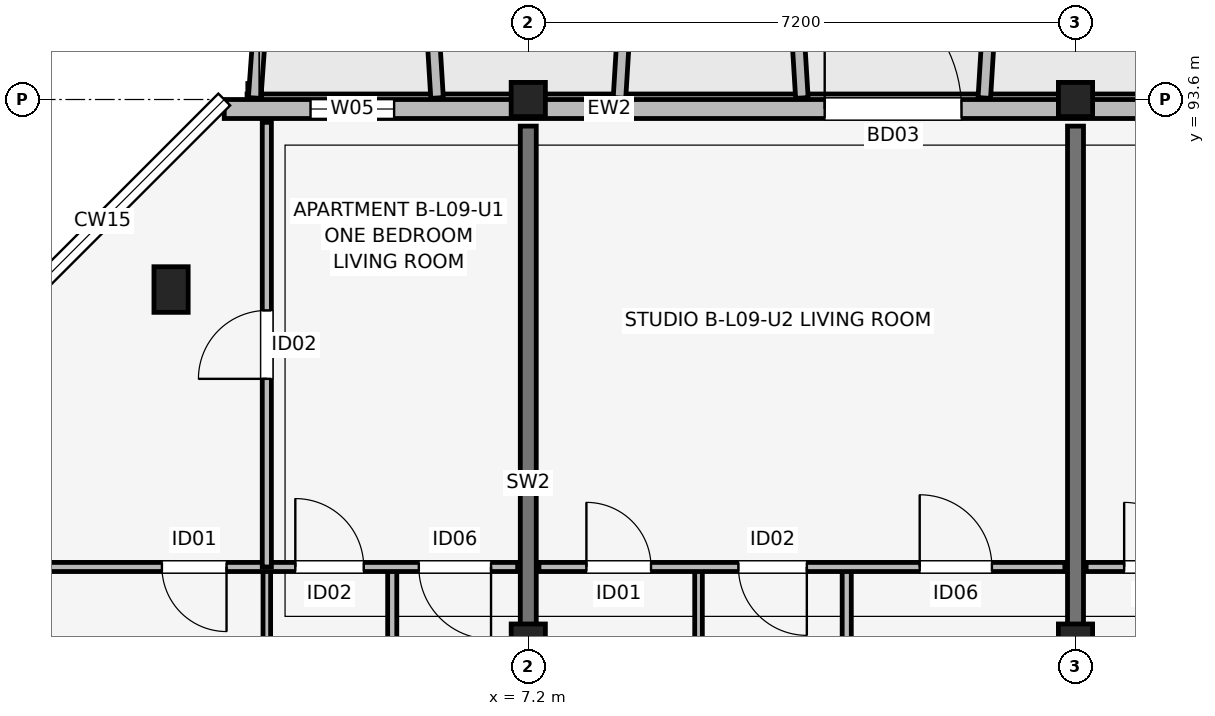
"""IFC4 building model, lengths in metres.
Left out: names, types, materials, properties, quantities, classifications, styles, units other than length and angle.
Written with IfcOpenShell. Run it as: python <this file> out.ifc"""

import sys

from ifc_helpers import new_model, si_unit, direction, frame, frame_2d, origin, origin_2d, place, context, subcontext, project, spatial, rectangle, extrude, element, fill, save


model = new_model("IFC4")
c1 = context("Model", 3, precision=1e-05, world=origin(), true_north=direction((0.0, 1.0)))
c2 = subcontext(c1, "Body", "Model", "MODEL_VIEW")
j1 = project(units=[si_unit("LENGTHUNIT", "METRE"), si_unit("PLANEANGLEUNIT", "RADIAN")], contexts=[c1])
p1 = place(None, origin())
s1 = spatial("IfcSite", under=j1, at=p1, CompositionType="ELEMENT")
p2 = place(p1, origin())
s2 = spatial("IfcBuilding", under=s1, at=p2, CompositionType="ELEMENT")
p3 = place(p2, frame((0.0, 0.0, 30.75)))
s3 = spatial("IfcBuildingStorey", under=s2, at=p3, CompositionType="ELEMENT", Elevation=30.75)
for number, where, z_axis, x_axis in (
    (1, (2.5, 91.1, 0.0), (0.0, 0.0, 1.0), (1.0, 0.0, 0.0)),
    (2, (7.2, 86.4, 0.0), (0.0, 0.0, 1.0), (1.0, 0.0, 0.0)),
):
    element("IfcColumn", number, at=place(p3, frame(where, z_axis=z_axis, x_axis=x_axis)), inside=s3, PredefinedType="COLUMN", context=c2, shape_type="SweptSolid", body=[
        extrude(rectangle(XDim=0.45, YDim=0.6, at=origin_2d()), origin(), (0.0, 0.0, 1.0), 3.15),
    ])
p4 = place(p3, frame((7.2, 93.6, 0.0), z_axis=(0.0, 0.0, 1.0), x_axis=(1.0, 0.0, 0.0)))
e3 = element("IfcColumn", 3, at=p4, inside=s3, PredefinedType="COLUMN", context=c2, shape_type="SweptSolid", body=[
    extrude(rectangle(XDim=0.45, YDim=0.45, at=origin_2d()), origin(), (0.0, 0.0, 1.0), 3.15),
])
p5 = place(p3, frame((14.4, 86.4, 0.0), z_axis=(0.0, 0.0, 1.0), x_axis=(1.0, 0.0, 0.0)))
e4 = element("IfcColumn", 4, at=p5, inside=s3, PredefinedType="COLUMN", context=c2, shape_type="SweptSolid", body=[
    extrude(rectangle(XDim=0.45, YDim=0.6, at=origin_2d()), origin(), (0.0, 0.0, 1.0), 3.15),
])
p6 = place(p3, frame((14.4, 93.6, 0.0), z_axis=(0.0, 0.0, 1.0), x_axis=(1.0, 0.0, 0.0)))
e5 = element("IfcColumn", 5, at=p6, inside=s3, PredefinedType="COLUMN", context=c2, shape_type="SweptSolid", body=[
    extrude(rectangle(XDim=0.45, YDim=0.45, at=origin_2d()), origin(), (0.0, 0.0, 1.0), 3.15),
])
for number, where, z_axis, x_axis in (
    (6, (7.2, 83.85, 0.0), (0.0, 0.0, 1.0), (0.0, 1.0, 0.0)),
    (7, (14.4, 83.85, 0.0), (0.0, 0.0, 1.0), (0.0, 1.0, 0.0)),
):
    element("IfcWall", number, at=place(p3, frame(where, z_axis=z_axis, x_axis=x_axis)), inside=s3, PredefinedType="SHEAR", context=c2, shape_type="SweptSolid", body=[
        extrude(rectangle(XDim=9.4, YDim=0.21, at=frame_2d((4.7, 0.0))), origin(), (0.0, 0.0, 1.0), 3.15),
    ])
p7 = place(p3, frame((32.8, 93.475, 0.0), z_axis=(0.0, 0.0, 1.0), x_axis=(-1.0, 0.0, 0.0)))
e8 = element("IfcWall", 8, at=p7, inside=s3, PredefinedType="SOLIDWALL", context=c2, shape_type="SweptSolid", body=[
    extrude(rectangle(XDim=29.6, YDim=0.25, at=frame_2d((14.8, 0.0))), origin(), (0.0, 0.0, 1.0), 2.45),
])
p8 = place(p7, frame((21.7, 0.0, 0.0), z_axis=(0.0, 0.0, 1.0), x_axis=(-1.0, 0.0, 0.0)))
e9 = element("IfcOpeningElement", 9, at=p8, cuts=e8, PredefinedType="OPENING", context=c2, shape_type="SweptSolid", body=[
    extrude(rectangle(XDim=1.8, YDim=2.15, at=frame_2d((0.9, 1.075))), frame((0.0, 0.135, 0.0), z_axis=(0.0, -1.0, 0.0), x_axis=(1.0, 0.0, 0.0)), (0.0, 0.0, 1.0), 0.27),
])
p9 = place(p7, frame((7.225, 0.0, 0.0), z_axis=(0.0, 0.0, 1.0), x_axis=(-1.0, 0.0, 0.0)))
e10 = element("IfcOpeningElement", 10, at=p9, cuts=e8, PredefinedType="OPENING", context=c2, shape_type="SweptSolid", body=[
    extrude(rectangle(XDim=1.65, YDim=2.15, at=frame_2d((0.825, 1.075))), frame((0.0, 0.135, 0.0), z_axis=(0.0, -1.0, 0.0), x_axis=(1.0, 0.0, 0.0)), (0.0, 0.0, 1.0), 0.27),
])
p10 = place(p7, frame((27.365, 0.0, 0.75)))
e11 = element("IfcOpeningElement", 11, at=p10, cuts=e8, PredefinedType="OPENING", context=c2, shape_type="SweptSolid", body=[
    extrude(rectangle(XDim=1.1, YDim=1.5, at=frame_2d((0.55, 0.75))), frame((0.0, 0.135, 0.0), z_axis=(0.0, -1.0, 0.0), x_axis=(1.0, 0.0, 0.0)), (0.0, 0.0, 1.0), 0.27),
])
p11 = place(p7, frame((14.925, 0.0, 0.69)))
e12 = element("IfcOpeningElement", 12, at=p11, cuts=e8, PredefinedType="OPENING", context=c2, shape_type="SweptSolid", body=[
    extrude(rectangle(XDim=2.15, YDim=1.65, at=frame_2d((1.075, 0.825))), frame((0.0, 0.135, 0.0), z_axis=(0.0, -1.0, 0.0), x_axis=(1.0, 0.0, 0.0)), (0.0, 0.0, 1.0), 0.27),
])
p12 = place(p7, frame((10.167, 0.0, 0.75)))
e13 = element("IfcOpeningElement", 13, at=p12, cuts=e8, PredefinedType="OPENING", context=c2, shape_type="SweptSolid", body=[
    extrude(rectangle(XDim=0.6, YDim=1.25, at=frame_2d((0.3, 0.625))), frame((0.0, 0.135, 0.0), z_axis=(0.0, -1.0, 0.0), x_axis=(1.0, 0.0, 0.0)), (0.0, 0.0, 1.0), 0.27),
])
p13 = place(p7, frame((2.968, 0.0, 0.75)))
e14 = element("IfcOpeningElement", 14, at=p13, cuts=e8, PredefinedType="OPENING", context=c2, shape_type="SweptSolid", body=[
    extrude(rectangle(XDim=0.6, YDim=1.25, at=frame_2d((0.3, 0.625))), frame((0.0, 0.135, 0.0), z_axis=(0.0, -1.0, 0.0), x_axis=(1.0, 0.0, 0.0)), (0.0, 0.0, 1.0), 0.27),
])
p14 = place(p7, frame((0.9, 0.0, 0.75)))
e15 = element("IfcOpeningElement", 15, at=p14, cuts=e8, PredefinedType="OPENING", context=c2, shape_type="SweptSolid", body=[
    extrude(rectangle(XDim=0.6, YDim=1.25, at=frame_2d((0.3, 0.625))), frame((0.0, 0.135, 0.0), z_axis=(0.0, -1.0, 0.0), x_axis=(1.0, 0.0, 0.0)), (0.0, 0.0, 1.0), 0.27),
])
p15 = place(p3, frame((3.6, 93.62, 0.0), z_axis=(0.0, 0.0, 1.0), x_axis=(0.071194071069, 0.997462482625, 0.0)))
e16 = element("IfcWall", 16, at=p15, inside=s3, PredefinedType="ELEMENTEDWALL", context=c2, shape_type="SweptSolid", body=[
    extrude(rectangle(XDim=1.965, YDim=0.165, at=frame_2d((0.982, 0.0))), origin(), (0.0, 0.0, 1.0), 2.8),
])
p16 = place(p3, frame((6.0, 93.62, 0.0), z_axis=(0.0, 0.0, 1.0), x_axis=(-0.061170732449, 0.998127317276, 0.0)))
e17 = element("IfcWall", 17, at=p16, inside=s3, PredefinedType="ELEMENTEDWALL", context=c2, shape_type="SweptSolid", body=[
    extrude(rectangle(XDim=1.964, YDim=0.165, at=frame_2d((0.982, 0.0))), origin(), (0.0, 0.0, 1.0), 2.8),
])
for number, where, z_axis, x_axis in (
    (18, (8.4, 93.62, 0.0), (0.0, 0.0, 1.0), (0.061, 0.998, 0.0)),
    (19, (10.8, 93.62, 0.0), (0.0, 0.0, 1.0), (-0.061, 0.998, 0.0)),
    (20, (13.2, 93.62, 0.0), (0.0, 0.0, 1.0), (0.061, 0.998, 0.0)),
):
    element("IfcWall", number, at=place(p3, frame(where, z_axis=z_axis, x_axis=x_axis)), inside=s3, PredefinedType="ELEMENTEDWALL", context=c2, shape_type="SweptSolid", body=[
        extrude(rectangle(XDim=1.964, YDim=0.165, at=frame_2d((0.982, 0.0))), origin(), (0.0, 0.0, 1.0), 2.58),
    ])
p17 = place(p3, frame((3.76, 83.7, 0.0), z_axis=(0.0, 0.0, 1.0), x_axis=(0.0, 1.0, 0.0)))
e21 = element("IfcWall", 21, at=p17, inside=s3, PredefinedType="PARTITIONING", context=c2, shape_type="SweptSolid", body=[
    extrude(rectangle(XDim=3.75, YDim=0.1, at=frame_2d((1.875, 0.0))), origin(), (0.0, 0.0, 1.0), 2.38),
])
p18 = place(p3, frame((5.41, 83.7, 0.0), z_axis=(0.0, 0.0, 1.0), x_axis=(0.0, 1.0, 0.0)))
e22 = element("IfcWall", 22, at=p18, inside=s3, PredefinedType="PARTITIONING", context=c2, shape_type="SweptSolid", body=[
    extrude(rectangle(XDim=3.75, YDim=0.12, at=frame_2d((1.875, 0.0))), origin(), (0.0, 0.0, 1.0), 2.38),
])
p19 = place(p3, frame((0.14, 87.45, 0.0), z_axis=(0.0, 0.0, 1.0), x_axis=(1.0, 0.0, 0.0)))
e23 = element("IfcWall", 23, at=p19, inside=s3, PredefinedType="PARTITIONING", context=c2, shape_type="SweptSolid", body=[
    extrude(rectangle(XDim=6.92, YDim=0.12, at=frame_2d((3.46, 0.0))), origin(), (0.0, 0.0, 1.0), 2.38),
])
p20 = place(p19, frame((3.09, 0.0, 0.0), z_axis=(0.0, 0.0, 1.0), x_axis=(-1.0, 0.0, 0.0)))
e24 = element("IfcOpeningElement", 24, at=p20, cuts=e23, PredefinedType="OPENING", context=c2, shape_type="SweptSolid", body=[
    extrude(rectangle(XDim=0.85, YDim=2.08, at=frame_2d((0.425, 1.04))), frame((0.0, 0.07, 0.0), z_axis=(0.0, -1.0, 0.0), x_axis=(1.0, 0.0, 0.0)), (0.0, 0.0, 1.0), 0.14),
])
p21 = place(p19, frame((3.995, 0.0, 0.0)))
e25 = element("IfcOpeningElement", 25, at=p21, cuts=e23, PredefinedType="OPENING", context=c2, shape_type="SweptSolid", body=[
    extrude(rectangle(XDim=0.9, YDim=2.08, at=frame_2d((0.45, 1.04))), frame((0.0, 0.07, 0.0), z_axis=(0.0, -1.0, 0.0), x_axis=(1.0, 0.0, 0.0)), (0.0, 0.0, 1.0), 0.14),
])
p22 = place(p19, frame((6.57, 0.0, 0.0), z_axis=(0.0, 0.0, 1.0), x_axis=(-1.0, 0.0, 0.0)))
e26 = element("IfcOpeningElement", 26, at=p22, cuts=e23, PredefinedType="OPENING", context=c2, shape_type="SweptSolid", body=[
    extrude(rectangle(XDim=0.95, YDim=2.08, at=frame_2d((0.475, 1.04))), frame((0.0, 0.07, 0.0), z_axis=(0.0, -1.0, 0.0), x_axis=(1.0, 0.0, 0.0)), (0.0, 0.0, 1.0), 0.14),
])
p23 = place(p3, frame((3.76, 87.45, 0.0), z_axis=(0.0, 0.0, 1.0), x_axis=(0.0, 1.0, 0.0)))
e27 = element("IfcWall", 27, at=p23, inside=s3, PredefinedType="PARTITIONING", context=c2, shape_type="SweptSolid", body=[
    extrude(rectangle(XDim=5.85, YDim=0.12, at=frame_2d((2.925, 0.0))), origin(), (0.0, 0.0, 1.0), 2.38),
])
p24 = place(p23, frame((2.475, 0.0, 0.0)))
e28 = element("IfcOpeningElement", 28, at=p24, cuts=e27, PredefinedType="OPENING", context=c2, shape_type="SweptSolid", body=[
    extrude(rectangle(XDim=0.9, YDim=2.08, at=frame_2d((0.45, 1.04))), frame((0.0, 0.07, 0.0), z_axis=(0.0, -1.0, 0.0), x_axis=(1.0, 0.0, 0.0)), (0.0, 0.0, 1.0), 0.14),
])
p25 = place(p3, frame((9.44, 83.7, 0.0), z_axis=(0.0, 0.0, 1.0), x_axis=(0.0, 1.0, 0.0)))
e29 = element("IfcWall", 29, at=p25, inside=s3, PredefinedType="PARTITIONING", context=c2, shape_type="SweptSolid", body=[
    extrude(rectangle(XDim=3.75, YDim=0.1, at=frame_2d((1.875, 0.0))), origin(), (0.0, 0.0, 1.0), 2.38),
])
p26 = place(p3, frame((11.39, 83.7, 0.0), z_axis=(0.0, 0.0, 1.0), x_axis=(0.0, 1.0, 0.0)))
e30 = element("IfcWall", 30, at=p26, inside=s3, PredefinedType="PARTITIONING", context=c2, shape_type="SweptSolid", body=[
    extrude(rectangle(XDim=3.75, YDim=0.12, at=frame_2d((1.875, 0.0))), origin(), (0.0, 0.0, 1.0), 2.38),
])
p27 = place(p3, frame((7.34, 87.45, 0.0), z_axis=(0.0, 0.0, 1.0), x_axis=(1.0, 0.0, 0.0)))
e31 = element("IfcWall", 31, at=p27, inside=s3, PredefinedType="PARTITIONING", context=c2, shape_type="SweptSolid", body=[
    extrude(rectangle(XDim=6.92, YDim=0.12, at=frame_2d((3.46, 0.0))), origin(), (0.0, 0.0, 1.0), 2.38),
])
p28 = place(p27, frame((0.625, 0.0, 0.0)))
e32 = element("IfcOpeningElement", 32, at=p28, cuts=e31, PredefinedType="OPENING", context=c2, shape_type="SweptSolid", body=[
    extrude(rectangle(XDim=0.85, YDim=2.08, at=frame_2d((0.425, 1.04))), frame((0.0, 0.07, 0.0), z_axis=(0.0, -1.0, 0.0), x_axis=(1.0, 0.0, 0.0)), (0.0, 0.0, 1.0), 0.14),
])
p29 = place(p27, frame((3.525, 0.0, 0.0), z_axis=(0.0, 0.0, 1.0), x_axis=(-1.0, 0.0, 0.0)))
e33 = element("IfcOpeningElement", 33, at=p29, cuts=e31, PredefinedType="OPENING", context=c2, shape_type="SweptSolid", body=[
    extrude(rectangle(XDim=0.9, YDim=2.08, at=frame_2d((0.45, 1.04))), frame((0.0, 0.07, 0.0), z_axis=(0.0, -1.0, 0.0), x_axis=(1.0, 0.0, 0.0)), (0.0, 0.0, 1.0), 0.14),
])
p30 = place(p27, frame((5.01, 0.0, 0.0)))
e34 = element("IfcOpeningElement", 34, at=p30, cuts=e31, PredefinedType="OPENING", context=c2, shape_type="SweptSolid", body=[
    extrude(rectangle(XDim=0.95, YDim=2.08, at=frame_2d((0.475, 1.04))), frame((0.0, 0.07, 0.0), z_axis=(0.0, -1.0, 0.0), x_axis=(1.0, 0.0, 0.0)), (0.0, 0.0, 1.0), 0.14),
])
p31 = place(p3, frame((14.54, 87.45, 0.0), z_axis=(0.0, 0.0, 1.0), x_axis=(1.0, 0.0, 0.0)))
e35 = element("IfcWall", 35, at=p31, inside=s3, PredefinedType="PARTITIONING", context=c2, shape_type="SweptSolid", body=[
    extrude(rectangle(XDim=6.92, YDim=0.12, at=frame_2d((3.46, 0.0))), origin(), (0.0, 0.0, 1.0), 2.38),
])
p32 = place(p31, frame((0.5, 0.0, 0.0)))
e36 = element("IfcOpeningElement", 36, at=p32, cuts=e35, PredefinedType="OPENING", context=c2, shape_type="SweptSolid", body=[
    extrude(rectangle(XDim=0.85, YDim=2.08, at=frame_2d((0.425, 1.04))), frame((0.0, 0.07, 0.0), z_axis=(0.0, -1.0, 0.0), x_axis=(1.0, 0.0, 0.0)), (0.0, 0.0, 1.0), 0.14),
])
p33 = place(p31, frame((3.275, 0.0, 0.0), z_axis=(0.0, 0.0, 1.0), x_axis=(-1.0, 0.0, 0.0)))
e37 = element("IfcOpeningElement", 37, at=p33, cuts=e35, PredefinedType="OPENING", context=c2, shape_type="SweptSolid", body=[
    extrude(rectangle(XDim=0.9, YDim=2.08, at=frame_2d((0.45, 1.04))), frame((0.0, 0.07, 0.0), z_axis=(0.0, -1.0, 0.0), x_axis=(1.0, 0.0, 0.0)), (0.0, 0.0, 1.0), 0.14),
])
p34 = place(p31, frame((4.885, 0.0, 0.0)))
e38 = element("IfcOpeningElement", 38, at=p34, cuts=e35, PredefinedType="OPENING", context=c2, shape_type="SweptSolid", body=[
    extrude(rectangle(XDim=0.95, YDim=2.08, at=frame_2d((0.475, 1.04))), frame((0.0, 0.07, 0.0), z_axis=(0.0, -1.0, 0.0), x_axis=(1.0, 0.0, 0.0)), (0.0, 0.0, 1.0), 0.14),
])
p35 = place(p8, origin())
e39 = element("IfcDoor", 39, at=p35, inside=s3, OperationType="SINGLE_SWING_RIGHT", PredefinedType="DOOR", context=c2, shape_type="SweptSolid", body=[
    extrude(rectangle(XDim=1.8, YDim=2.15, at=frame_2d((0.9, 1.075))), frame((0.0, 0.025, 0.0), z_axis=(0.0, -1.0, 0.0), x_axis=(1.0, 0.0, 0.0)), (0.0, 0.0, 1.0), 0.05),
])
fill(e9, e39)
p36 = place(p10, origin())
e40 = element("IfcWindow", 40, at=p36, inside=s3, PartitioningType="SINGLE_PANEL", PredefinedType="WINDOW", context=c2, shape_type="SweptSolid", body=[
    extrude(rectangle(XDim=1.1, YDim=1.5, at=frame_2d((0.55, 0.75))), frame((0.0, 0.03, 0.0), z_axis=(0.0, -1.0, 0.0), x_axis=(1.0, 0.0, 0.0)), (0.0, 0.0, 1.0), 0.06),
])
fill(e11, e40)
p37 = place(p20, origin())
e41 = element("IfcDoor", 41, at=p37, inside=s3, OperationType="SINGLE_SWING_RIGHT", PredefinedType="DOOR", context=c2, shape_type="SweptSolid", body=[
    extrude(rectangle(XDim=0.85, YDim=2.08, at=frame_2d((0.425, 1.04))), frame((0.0, 0.025, 0.0), z_axis=(0.0, -1.0, 0.0), x_axis=(1.0, 0.0, 0.0)), (0.0, 0.0, 1.0), 0.05),
])
fill(e24, e41)
p38 = place(p21, origin())
e42 = element("IfcDoor", 42, at=p38, inside=s3, OperationType="SINGLE_SWING_LEFT", PredefinedType="DOOR", context=c2, shape_type="SweptSolid", body=[
    extrude(rectangle(XDim=0.9, YDim=2.08, at=frame_2d((0.45, 1.04))), frame((0.0, 0.025, 0.0), z_axis=(0.0, -1.0, 0.0), x_axis=(1.0, 0.0, 0.0)), (0.0, 0.0, 1.0), 0.05),
])
fill(e25, e42)
p39 = place(p22, origin())
e43 = element("IfcDoor", 43, at=p39, inside=s3, OperationType="SINGLE_SWING_RIGHT", PredefinedType="DOOR", context=c2, shape_type="SweptSolid", body=[
    extrude(rectangle(XDim=0.95, YDim=2.08, at=frame_2d((0.475, 1.04))), frame((0.0, 0.025, 0.0), z_axis=(0.0, -1.0, 0.0), x_axis=(1.0, 0.0, 0.0)), (0.0, 0.0, 1.0), 0.05),
])
fill(e26, e43)
p40 = place(p24, origin())
e44 = element("IfcDoor", 44, at=p40, inside=s3, OperationType="SINGLE_SWING_LEFT", PredefinedType="DOOR", context=c2, shape_type="SweptSolid", body=[
    extrude(rectangle(XDim=0.9, YDim=2.08, at=frame_2d((0.45, 1.04))), frame((0.0, 0.025, 0.0), z_axis=(0.0, -1.0, 0.0), x_axis=(1.0, 0.0, 0.0)), (0.0, 0.0, 1.0), 0.05),
])
fill(e28, e44)
p41 = place(p28, origin())
e45 = element("IfcDoor", 45, at=p41, inside=s3, OperationType="SINGLE_SWING_LEFT", PredefinedType="DOOR", context=c2, shape_type="SweptSolid", body=[
    extrude(rectangle(XDim=0.85, YDim=2.08, at=frame_2d((0.425, 1.04))), frame((0.0, 0.025, 0.0), z_axis=(0.0, -1.0, 0.0), x_axis=(1.0, 0.0, 0.0)), (0.0, 0.0, 1.0), 0.05),
])
fill(e32, e45)
p42 = place(p29, origin())
e46 = element("IfcDoor", 46, at=p42, inside=s3, OperationType="SINGLE_SWING_RIGHT", PredefinedType="DOOR", context=c2, shape_type="SweptSolid", body=[
    extrude(rectangle(XDim=0.9, YDim=2.08, at=frame_2d((0.45, 1.04))), frame((0.0, 0.025, 0.0), z_axis=(0.0, -1.0, 0.0), x_axis=(1.0, 0.0, 0.0)), (0.0, 0.0, 1.0), 0.05),
])
fill(e33, e46)
p43 = place(p30, origin())
e47 = element("IfcDoor", 47, at=p43, inside=s3, OperationType="SINGLE_SWING_LEFT", PredefinedType="DOOR", context=c2, shape_type="SweptSolid", body=[
    extrude(rectangle(XDim=0.95, YDim=2.08, at=frame_2d((0.475, 1.04))), frame((0.0, 0.025, 0.0), z_axis=(0.0, -1.0, 0.0), x_axis=(1.0, 0.0, 0.0)), (0.0, 0.0, 1.0), 0.05),
])
fill(e34, e47)
p44 = place(p32, origin())
e48 = element("IfcDoor", 48, at=p44, inside=s3, OperationType="SINGLE_SWING_LEFT", PredefinedType="DOOR", context=c2, shape_type="SweptSolid", body=[
    extrude(rectangle(XDim=0.85, YDim=2.08, at=frame_2d((0.425, 1.04))), frame((0.0, 0.025, 0.0), z_axis=(0.0, -1.0, 0.0), x_axis=(1.0, 0.0, 0.0)), (0.0, 0.0, 1.0), 0.05),
])
fill(e36, e48)
save(model, sys.argv[1])
